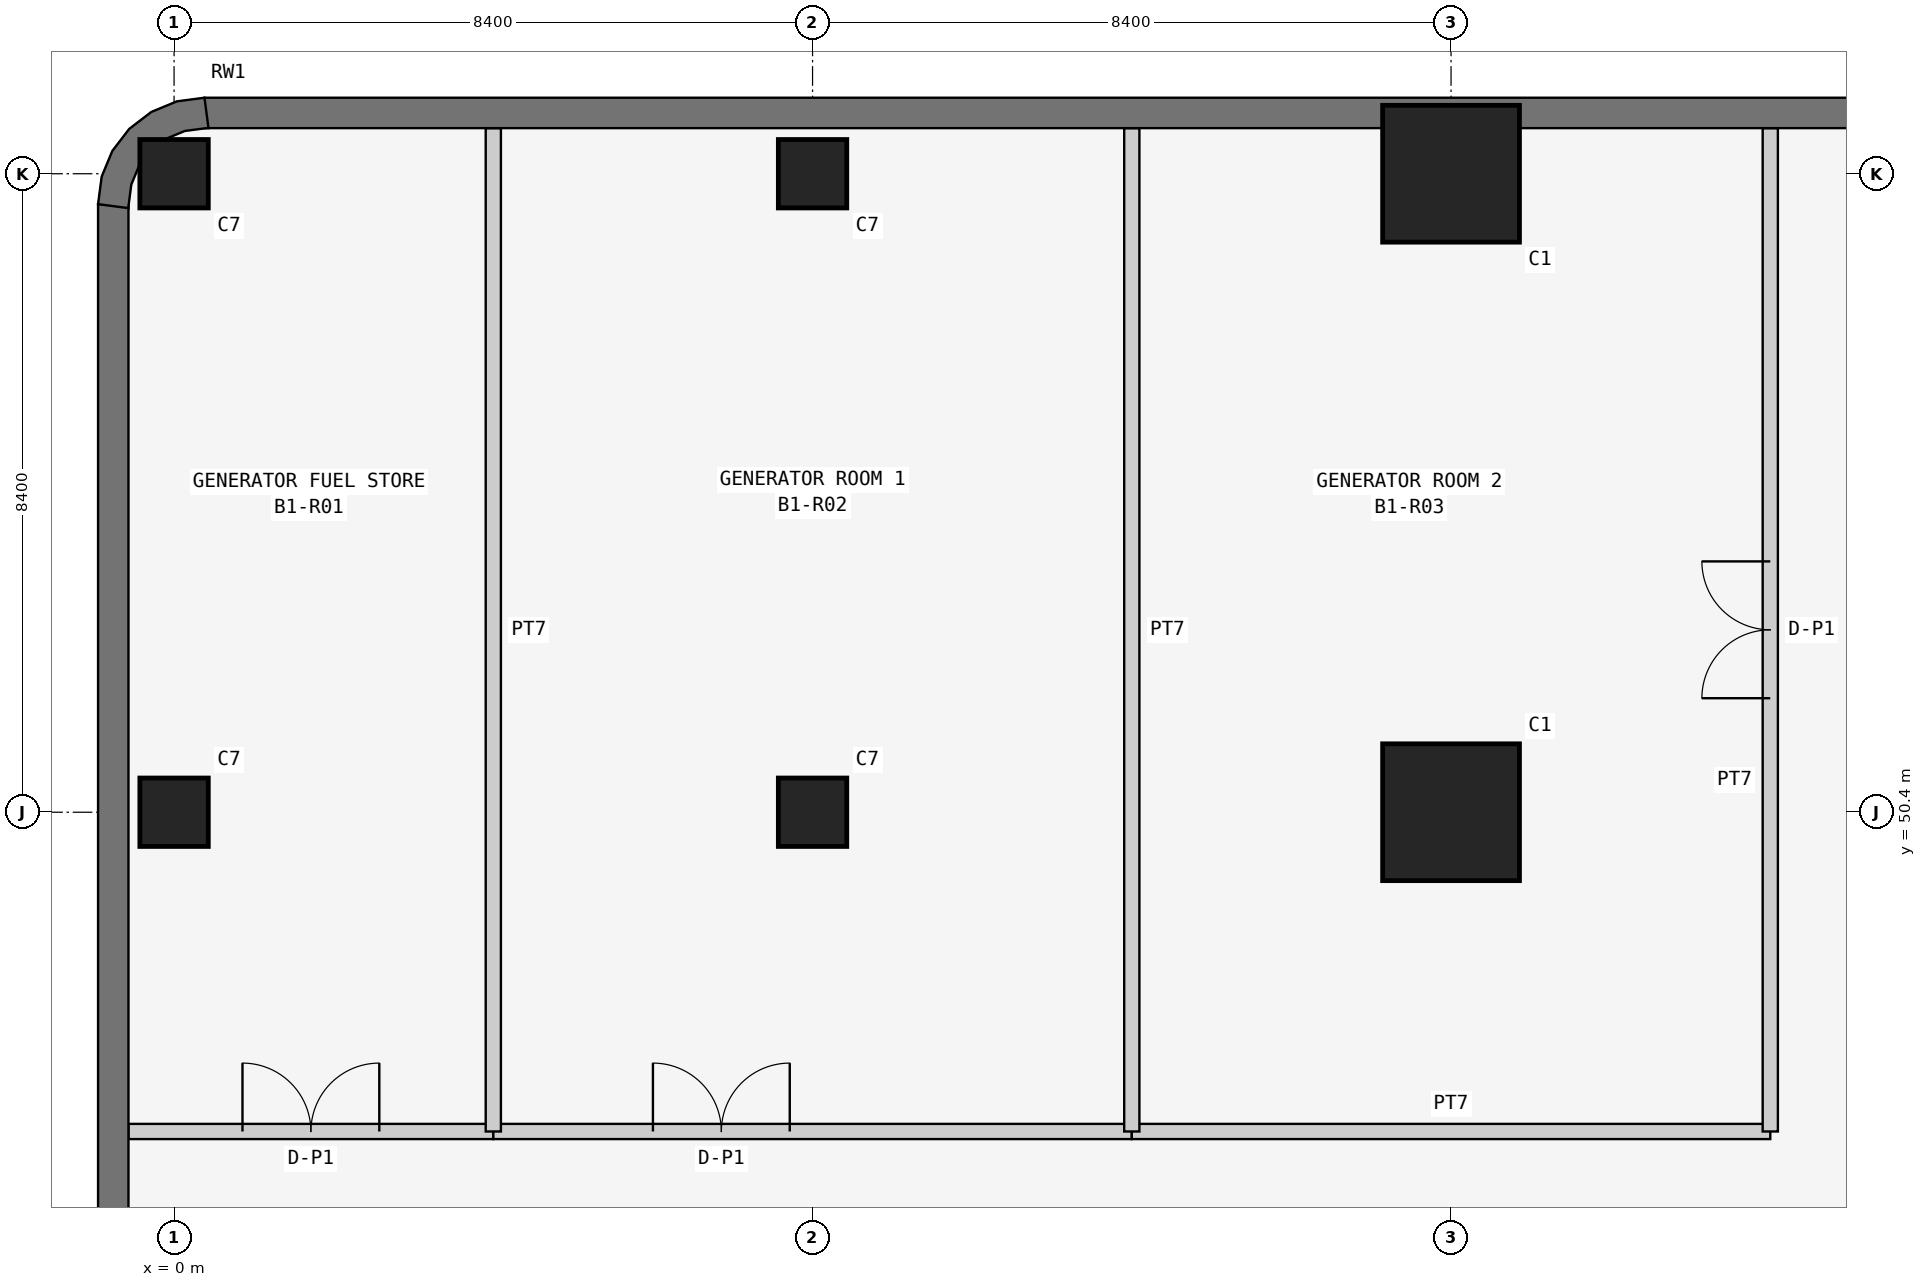
"""IFC4 building model, lengths in metres.
Left out: names, types, materials, properties, quantities, classifications, styles, units other than length and angle.
Written with IfcOpenShell. Run it as: python <this file> out.ifc"""

import sys

from ifc_helpers import new_model, si_unit, direction, frame, frame_2d, origin, origin_2d, place, context, subcontext, project, spatial, polyline, rectangle, outline, extrude, element, fill, save


model = new_model("IFC4")
c1 = context("Model", 3, precision=1e-05, world=origin(), true_north=direction((0.0, 1.0)))
c2 = subcontext(c1, "Body", "Model", "MODEL_VIEW")
j1 = project(units=[si_unit("LENGTHUNIT", "METRE"), si_unit("PLANEANGLEUNIT", "RADIAN")], contexts=[c1])
p1 = place(None, origin())
s1 = spatial("IfcSite", under=j1, at=p1, CompositionType="ELEMENT")
p2 = place(p1, origin())
s2 = spatial("IfcBuilding", under=s1, at=p2, CompositionType="ELEMENT")
p3 = place(p2, frame((0.0, 0.0, -3.6)))
s3 = spatial("IfcBuildingStorey", under=s2, at=p3, CompositionType="ELEMENT", Elevation=-3.6)
for number, where, z_axis, x_axis in (
    (1, (0.0, 50.4, 0.0), (0.0, 0.0, 1.0), (1.0, 0.0, 0.0)),
    (2, (0.0, 58.8, 0.0), (0.0, 0.0, 1.0), (1.0, 0.0, 0.0)),
    (3, (8.4, 50.4, 0.0), (0.0, 0.0, 1.0), (1.0, 0.0, 0.0)),
    (4, (8.4, 58.8, 0.0), (0.0, 0.0, 1.0), (1.0, 0.0, 0.0)),
):
    element("IfcColumn", number, at=place(p3, frame(where, z_axis=z_axis, x_axis=x_axis)), inside=s3, PredefinedType="COLUMN", context=c2, shape_type="SweptSolid", body=[
        extrude(rectangle(XDim=0.9, YDim=0.9, at=origin_2d()), origin(), (0.0, 0.0, 1.0), 3.6),
    ])
for number, where, z_axis, x_axis in (
    (5, (16.8, 50.4, 0.0), (0.0, 0.0, 1.0), (1.0, 0.0, 0.0)),
    (6, (16.8, 58.8, 0.0), (0.0, 0.0, 1.0), (1.0, 0.0, 0.0)),
):
    element("IfcColumn", number, at=place(p3, frame(where, z_axis=z_axis, x_axis=x_axis)), inside=s3, PredefinedType="COLUMN", context=c2, shape_type="SweptSolid", body=[
        extrude(rectangle(XDim=1.8, YDim=1.8, at=origin_2d()), origin(), (0.0, 0.0, 1.0), 3.6),
    ])
p4 = place(p3, frame((58.4, 59.6, 0.0), z_axis=(0.0, 0.0, 1.0), x_axis=(-1.0, 0.0, 0.0)))
e7 = element("IfcWall", 7, at=p4, inside=s3, PredefinedType="SOLIDWALL", context=c2, shape_type="SweptSolid", body=[
    extrude(rectangle(XDim=58.0, YDim=0.4, at=frame_2d((29.0, 0.0))), origin(), (0.0, 0.0, 1.0), 3.6),
])
p5 = place(p3, frame((-0.8, 58.4, 0.0), z_axis=(0.0, 0.0, 1.0), x_axis=(0.0, -1.0, 0.0)))
e8 = element("IfcWall", 8, at=p5, inside=s3, PredefinedType="SOLIDWALL", context=c2, shape_type="SweptSolid", body=[
    extrude(rectangle(XDim=74.8, YDim=0.4, at=frame_2d((37.4, 0.0))), origin(), (0.0, 0.0, 1.0), 3.6),
])
p6 = place(p3, origin())
e9 = element("IfcWall", 9, at=p6, inside=s3, PredefinedType="SOLIDWALL", context=c2, shape_type="SweptSolid", body=[
    extrude(outline(polyline([(-1.0, 58.4), (-0.6, 58.347), (-0.6, 58.374), (-0.562, 58.658), (-0.463, 58.898), (-0.305, 59.104), (-0.098, 59.263), (0.142, 59.363), (0.426, 59.4), (0.453, 59.4), (0.4, 59.8), (0.038, 59.752), (-0.3, 59.612), (-0.59, 59.39), (-0.812, 59.1), (-0.952, 58.762), (-1.0, 58.4)])), origin(), (0.0, 0.0, 1.0), 3.6),
])
p7 = place(p3, frame((-0.6, 46.2, 0.0), z_axis=(0.0, 0.0, 1.0), x_axis=(1.0, 0.0, 0.0)))
e10 = element("IfcWall", 10, at=p7, inside=s3, PredefinedType="PARTITIONING", context=c2, shape_type="SweptSolid", body=[
    extrude(rectangle(XDim=4.8, YDim=0.2, at=frame_2d((2.4, 0.0))), origin(), (0.0, 0.0, 1.0), 3.3),
])
p8 = place(p7, frame((1.5, 0.0, 0.0)))
e11 = element("IfcOpeningElement", 11, at=p8, cuts=e10, PredefinedType="OPENING", context=c2, shape_type="SweptSolid", body=[
    extrude(rectangle(XDim=1.8, YDim=2.4, at=frame_2d((0.9, 1.2))), frame((0.0, 0.11, 0.0), z_axis=(0.0, -1.0, 0.0), x_axis=(1.0, 0.0, 0.0)), (0.0, 0.0, 1.0), 0.22),
])
p9 = place(p3, frame((4.2, 46.2, 0.0), z_axis=(0.0, 0.0, 1.0), x_axis=(1.0, 0.0, 0.0)))
e12 = element("IfcWall", 12, at=p9, inside=s3, PredefinedType="PARTITIONING", context=c2, shape_type="SweptSolid", body=[
    extrude(rectangle(XDim=8.4, YDim=0.2, at=frame_2d((4.2, 0.0))), origin(), (0.0, 0.0, 1.0), 3.3),
])
p10 = place(p9, frame((2.1, 0.0, 0.0)))
e13 = element("IfcOpeningElement", 13, at=p10, cuts=e12, PredefinedType="OPENING", context=c2, shape_type="SweptSolid", body=[
    extrude(rectangle(XDim=1.8, YDim=2.4, at=frame_2d((0.9, 1.2))), frame((0.0, 0.11, 0.0), z_axis=(0.0, -1.0, 0.0), x_axis=(1.0, 0.0, 0.0)), (0.0, 0.0, 1.0), 0.22),
])
p11 = place(p3, frame((12.6, 46.2, 0.0), z_axis=(0.0, 0.0, 1.0), x_axis=(1.0, 0.0, 0.0)))
e14 = element("IfcWall", 14, at=p11, inside=s3, PredefinedType="PARTITIONING", context=c2, shape_type="SweptSolid", body=[
    extrude(rectangle(XDim=8.4, YDim=0.2, at=frame_2d((4.2, 0.0))), origin(), (0.0, 0.0, 1.0), 3.3),
])
p12 = place(p3, frame((21.0, 46.2, 0.0), z_axis=(0.0, 0.0, 1.0), x_axis=(0.0, 1.0, 0.0)))
e15 = element("IfcWall", 15, at=p12, inside=s3, PredefinedType="PARTITIONING", context=c2, shape_type="SweptSolid", body=[
    extrude(rectangle(XDim=13.2, YDim=0.2, at=frame_2d((6.6, 0.0))), origin(), (0.0, 0.0, 1.0), 2.688),
])
p13 = place(p12, frame((5.7, 0.0, 0.0)))
e16 = element("IfcOpeningElement", 16, at=p13, cuts=e15, PredefinedType="OPENING", context=c2, shape_type="SweptSolid", body=[
    extrude(rectangle(XDim=1.8, YDim=2.4, at=frame_2d((0.9, 1.2))), frame((0.0, 0.11, 0.0), z_axis=(0.0, -1.0, 0.0), x_axis=(1.0, 0.0, 0.0)), (0.0, 0.0, 1.0), 0.22),
])
for number, where, z_axis, x_axis in (
    (17, (4.2, 59.4, 0.0), (0.0, 0.0, 1.0), (0.0, -1.0, 0.0)),
    (18, (12.6, 59.4, 0.0), (0.0, 0.0, 1.0), (0.0, -1.0, 0.0)),
):
    element("IfcWall", number, at=place(p3, frame(where, z_axis=z_axis, x_axis=x_axis)), inside=s3, PredefinedType="PARTITIONING", context=c2, shape_type="SweptSolid", body=[
        extrude(rectangle(XDim=13.2, YDim=0.2, at=frame_2d((6.6, 0.0))), origin(), (0.0, 0.0, 1.0), 2.688),
    ])
p14 = place(p8, origin())
e19 = element("IfcDoor", 19, at=p14, inside=s3, OperationType="DOUBLE_DOOR_SINGLE_SWING", PredefinedType="DOOR", context=c2, shape_type="SweptSolid", body=[
    extrude(rectangle(XDim=1.8, YDim=2.4, at=frame_2d((0.9, 1.2))), frame((0.0, 0.025, 0.0), z_axis=(0.0, -1.0, 0.0), x_axis=(1.0, 0.0, 0.0)), (0.0, 0.0, 1.0), 0.05),
])
fill(e11, e19)
p15 = place(p10, origin())
e20 = element("IfcDoor", 20, at=p15, inside=s3, OperationType="DOUBLE_DOOR_SINGLE_SWING", PredefinedType="DOOR", context=c2, shape_type="SweptSolid", body=[
    extrude(rectangle(XDim=1.8, YDim=2.4, at=frame_2d((0.9, 1.2))), frame((0.0, 0.025, 0.0), z_axis=(0.0, -1.0, 0.0), x_axis=(1.0, 0.0, 0.0)), (0.0, 0.0, 1.0), 0.05),
])
fill(e13, e20)
p16 = place(p13, origin())
e21 = element("IfcDoor", 21, at=p16, inside=s3, OperationType="DOUBLE_DOOR_SINGLE_SWING", PredefinedType="DOOR", context=c2, shape_type="SweptSolid", body=[
    extrude(rectangle(XDim=1.8, YDim=2.4, at=frame_2d((0.9, 1.2))), frame((0.0, 0.025, 0.0), z_axis=(0.0, -1.0, 0.0), x_axis=(1.0, 0.0, 0.0)), (0.0, 0.0, 1.0), 0.05),
])
fill(e16, e21)
save(model, sys.argv[1])
